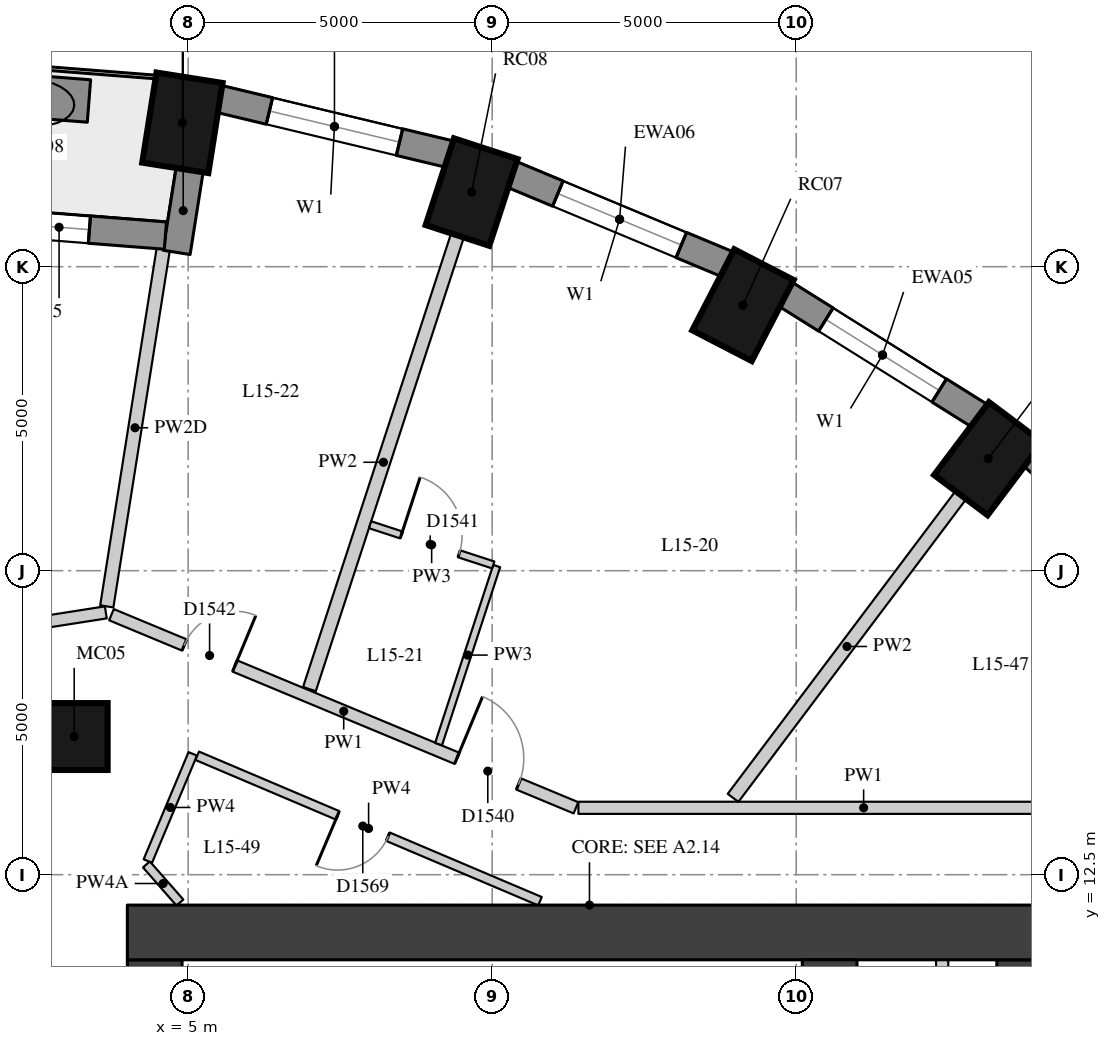
"""IFC4 building model, lengths in metres.
Left out: names, types, materials, properties, quantities, classifications, styles, units other than length and angle.
Written with IfcOpenShell. Run it as: python <this file> out.ifc"""

import sys

from ifc_helpers import new_model, si_unit, direction, frame, frame_2d, origin, origin_2d, place, context, subcontext, project, spatial, rectangle, extrude, element, fill, save


model = new_model("IFC4")
c1 = context("Model", 3, precision=1e-05, world=origin(), true_north=direction((0.0, 1.0)))
c2 = subcontext(c1, "Body", "Model", "MODEL_VIEW")
j1 = project(units=[si_unit("LENGTHUNIT", "METRE"), si_unit("PLANEANGLEUNIT", "RADIAN")], contexts=[c1])
p1 = place(None, origin())
s1 = spatial("IfcSite", under=j1, at=p1, CompositionType="ELEMENT")
p2 = place(p1, origin())
s2 = spatial("IfcBuilding", under=s1, at=p2, CompositionType="ELEMENT")
p3 = place(p2, frame((0.0, 0.0, 58.0)))
s3 = spatial("IfcBuildingStorey", under=s2, at=p3, CompositionType="ELEMENT", Elevation=58.0)
for number, where, z_axis, x_axis in (
    (1, (18.159, 19.343, 0.0), (0.0, 0.0, 1.0), (0.601, 0.799, 0.0)),
    (2, (14.125, 21.867, 0.0), (0.0, 0.0, 1.0), (0.46, 0.888, 0.0)),
    (3, (9.662, 23.727, 0.0), (0.0, 0.0, 1.0), (0.31, 0.951, 0.0)),
    (4, (4.906, 24.866, 0.0), (0.0, 0.0, 1.0), (0.156, 0.988, 0.0)),
):
    element("IfcColumn", number, at=place(p3, frame(where, z_axis=z_axis, x_axis=x_axis)), inside=s3, PredefinedType="COLUMN", context=c2, shape_type="SweptSolid", body=[
        extrude(rectangle(XDim=1.5, YDim=1.1, at=origin_2d()), origin(), (0.0, 0.0, 1.0), 3.3),
    ])
p4 = place(p3, frame((3.126, 14.772, 0.0), z_axis=(0.0, 0.0, 1.0), x_axis=(1.0, 0.0, 0.0)))
e5 = element("IfcColumn", 5, at=p4, inside=s3, PredefinedType="COLUMN", context=c2, shape_type="SweptSolid", body=[
    extrude(rectangle(XDim=1.1, YDim=1.1, at=origin_2d()), origin(), (0.0, 0.0, 1.0), 3.3),
])
p5 = place(p3, frame((21.627, 16.943, 0.0), z_axis=(0.0, 0.0, 1.0), x_axis=(-0.745526233716, 0.66647628228, 0.0)))
e6 = element("IfcWall", 6, at=p5, inside=s3, PredefinedType="SOLIDWALL", context=c2, shape_type="SweptSolid", body=[
    extrude(rectangle(XDim=3.697, YDim=0.45, at=frame_2d((1.848, 0.0))), origin(), (0.0, 0.0, 1.0), 3.02),
])
p6 = place(p3, frame((18.023, 20.044, 0.0), z_axis=(0.0, 0.0, 1.0), x_axis=(-0.847635480093, 0.530579016629, 0.0)))
e7 = element("IfcWall", 7, at=p6, inside=s3, PredefinedType="SOLIDWALL", context=c2, shape_type="SweptSolid", body=[
    extrude(rectangle(XDim=3.782, YDim=0.45, at=frame_2d((1.891, 0.0))), origin(), (0.0, 0.0, 1.0), 3.02),
])
p7 = place(p6, frame((0.791, 0.0, 0.4)))
e8 = element("IfcOpeningElement", 8, at=p7, cuts=e7, PredefinedType="OPENING", context=c2, shape_type="SweptSolid", body=[
    extrude(rectangle(XDim=2.2, YDim=1.75, at=frame_2d((1.1, 0.875))), frame((0.0, 0.235, 0.0), z_axis=(0.0, -1.0, 0.0), x_axis=(1.0, 0.0, 0.0)), (0.0, 0.0, 1.0), 0.47),
])
p8 = place(p3, frame((13.875, 22.537, 0.0), z_axis=(0.0, 0.0, 1.0), x_axis=(-0.923031964282, 0.384723267966, 0.0)))
e9 = element("IfcWall", 9, at=p8, inside=s3, PredefinedType="SOLIDWALL", context=c2, shape_type="SweptSolid", body=[
    extrude(rectangle(XDim=3.856, YDim=0.45, at=frame_2d((1.928, 0.0))), origin(), (0.0, 0.0, 1.0), 3.02),
])
p9 = place(p8, frame((0.828, 0.0, 0.4)))
e10 = element("IfcOpeningElement", 10, at=p9, cuts=e9, PredefinedType="OPENING", context=c2, shape_type="SweptSolid", body=[
    extrude(rectangle(XDim=2.2, YDim=1.75, at=frame_2d((1.1, 0.875))), frame((0.0, 0.235, 0.0), z_axis=(0.0, -1.0, 0.0), x_axis=(1.0, 0.0, 0.0)), (0.0, 0.0, 1.0), 0.47),
])
p10 = place(p3, frame((9.308, 24.35, 0.0), z_axis=(0.0, 0.0, 1.0), x_axis=(-0.972496561493, 0.232917233979, 0.0)))
e11 = element("IfcWall", 11, at=p10, inside=s3, PredefinedType="SOLIDWALL", context=c2, shape_type="SweptSolid", body=[
    extrude(rectangle(XDim=3.911, YDim=0.45, at=frame_2d((1.956, 0.0))), origin(), (0.0, 0.0, 1.0), 3.02),
])
p11 = place(p10, frame((0.855, 0.0, 0.4)))
e12 = element("IfcOpeningElement", 12, at=p11, cuts=e11, PredefinedType="OPENING", context=c2, shape_type="SweptSolid", body=[
    extrude(rectangle(XDim=2.2, YDim=1.75, at=frame_2d((1.1, 0.875))), frame((0.0, 0.235, 0.0), z_axis=(0.0, -1.0, 0.0), x_axis=(1.0, 0.0, 0.0)), (0.0, 0.0, 1.0), 0.47),
])
p12 = place(p3, frame((5.027, 24.108, 0.0), z_axis=(0.0, 0.0, 1.0), x_axis=(-0.156133927791, -0.98773589415, 0.0)))
e13 = element("IfcWall", 13, at=p12, inside=s3, PredefinedType="SOLIDWALL", context=c2, shape_type="SweptSolid", body=[
    extrude(rectangle(XDim=1.39, YDim=0.45, at=frame_2d((0.695, 0.0))), origin(), (0.0, 0.0, 1.0), 2.47),
])
p13 = place(p3, frame((4.626, 23.011, 0.0), z_axis=(0.0, 0.0, 1.0), x_axis=(-0.996937095772, 0.078207589615, 0.0)))
e14 = element("IfcWall", 14, at=p13, inside=s3, PredefinedType="SOLIDWALL", context=c2, shape_type="SweptSolid", body=[
    extrude(rectangle(XDim=4.657, YDim=0.45, at=frame_2d((2.329, 0.0))), origin(), (0.0, 0.0, 1.0), 3.02),
])
p14 = place(p13, frame((1.254, 0.0, 0.4)))
e15 = element("IfcOpeningElement", 15, at=p14, cuts=e14, PredefinedType="OPENING", context=c2, shape_type="SweptSolid", body=[
    extrude(rectangle(XDim=1.0, YDim=1.75, at=frame_2d((0.5, 0.875))), frame((0.0, 0.235, 0.0), z_axis=(0.0, -1.0, 0.0), x_axis=(1.0, 0.0, 0.0)), (0.0, 0.0, 1.0), 0.47),
])
p15 = place(p13, frame((2.404, 0.0, 0.0)))
e16 = element("IfcOpeningElement", 16, at=p15, cuts=e14, PredefinedType="OPENING", context=c2, shape_type="SweptSolid", body=[
    extrude(rectangle(XDim=1.0, YDim=2.15, at=frame_2d((0.5, 1.075))), frame((0.0, 0.235, 0.0), z_axis=(0.0, -1.0, 0.0), x_axis=(1.0, 0.0, 0.0)), (0.0, 0.0, 1.0), 0.47),
])
p16 = place(p3, frame((3.369, 25.225, 0.0), z_axis=(0.0, 0.0, 1.0), x_axis=(-0.996965267018, 0.077847648384, 0.0)))
e17 = element("IfcWall", 17, at=p16, inside=s3, PredefinedType="USERDEFINED", context=c2, shape_type="SweptSolid", body=[
    extrude(rectangle(XDim=1.8, YDim=0.7, at=frame_2d((0.9, 0.0))), origin(), (0.0, 0.0, 1.0), 0.75),
])
p17 = place(p3, frame((4.45, -11.1, 0.0), z_axis=(0.0, 0.0, 1.0), x_axis=(0.0, 1.0, 0.0)))
e18 = element("IfcWall", 18, at=p17, inside=s3, PredefinedType="SHEAR", context=c2, shape_type="SweptSolid", body=[
    extrude(rectangle(XDim=22.2, YDim=0.9, at=frame_2d((11.1, 0.0))), origin(), (0.0, 0.0, 1.0), 3.02),
])
p18 = place(p17, frame((2.35, 0.0, 0.0)))
e19 = element("IfcOpeningElement", 19, at=p18, cuts=e18, PredefinedType="OPENING", context=c2, shape_type="SweptSolid", body=[
    extrude(rectangle(XDim=1.5, YDim=2.1, at=frame_2d((0.75, 1.05))), frame((0.0, 0.46, 0.0), z_axis=(0.0, -1.0, 0.0), x_axis=(1.0, 0.0, 0.0)), (0.0, 0.0, 1.0), 0.92),
])
p19 = place(p17, frame((5.45, 0.0, 0.0)))
e20 = element("IfcOpeningElement", 20, at=p19, cuts=e18, PredefinedType="OPENING", context=c2, shape_type="SweptSolid", body=[
    extrude(rectangle(XDim=1.8, YDim=2.1, at=frame_2d((0.9, 1.05))), frame((0.0, 0.46, 0.0), z_axis=(0.0, -1.0, 0.0), x_axis=(1.0, 0.0, 0.0)), (0.0, 0.0, 1.0), 0.92),
])
p20 = place(p17, frame((7.95, 0.0, 0.0)))
e21 = element("IfcOpeningElement", 21, at=p20, cuts=e18, PredefinedType="OPENING", context=c2, shape_type="SweptSolid", body=[
    extrude(rectangle(XDim=1.1, YDim=2.1, at=frame_2d((0.55, 1.05))), frame((0.0, 0.46, 0.0), z_axis=(0.0, -1.0, 0.0), x_axis=(1.0, 0.0, 0.0)), (0.0, 0.0, 1.0), 0.92),
])
p21 = place(p17, frame((10.6, 0.0, 0.0)))
e22 = element("IfcOpeningElement", 22, at=p21, cuts=e18, PredefinedType="OPENING", context=c2, shape_type="SweptSolid", body=[
    extrude(rectangle(XDim=1.0, YDim=2.1, at=frame_2d((0.5, 1.05))), frame((0.0, 0.46, 0.0), z_axis=(0.0, -1.0, 0.0), x_axis=(1.0, 0.0, 0.0)), (0.0, 0.0, 1.0), 0.92),
])
p22 = place(p17, frame((13.15, 0.0, 0.0)))
e23 = element("IfcOpeningElement", 23, at=p22, cuts=e18, PredefinedType="OPENING", context=c2, shape_type="SweptSolid", body=[
    extrude(rectangle(XDim=1.1, YDim=2.1, at=frame_2d((0.55, 1.05))), frame((0.0, 0.46, 0.0), z_axis=(0.0, -1.0, 0.0), x_axis=(1.0, 0.0, 0.0)), (0.0, 0.0, 1.0), 0.92),
])
p23 = place(p17, frame((14.95, 0.0, 0.0)))
e24 = element("IfcOpeningElement", 24, at=p23, cuts=e18, PredefinedType="OPENING", context=c2, shape_type="SweptSolid", body=[
    extrude(rectangle(XDim=1.8, YDim=2.1, at=frame_2d((0.9, 1.05))), frame((0.0, 0.46, 0.0), z_axis=(0.0, -1.0, 0.0), x_axis=(1.0, 0.0, 0.0)), (0.0, 0.0, 1.0), 0.92),
])
p24 = place(p17, frame((18.35, 0.0, 0.0)))
e25 = element("IfcOpeningElement", 25, at=p24, cuts=e18, PredefinedType="OPENING", context=c2, shape_type="SweptSolid", body=[
    extrude(rectangle(XDim=1.5, YDim=2.1, at=frame_2d((0.75, 1.05))), frame((0.0, 0.46, 0.0), z_axis=(0.0, -1.0, 0.0), x_axis=(1.0, 0.0, 0.0)), (0.0, 0.0, 1.0), 0.92),
])
p25 = place(p3, frame((18.75, -11.1, 0.0), z_axis=(0.0, 0.0, 1.0), x_axis=(0.0, 1.0, 0.0)))
e26 = element("IfcWall", 26, at=p25, inside=s3, PredefinedType="SHEAR", context=c2, shape_type="SweptSolid", body=[
    extrude(rectangle(XDim=22.2, YDim=0.9, at=frame_2d((11.1, 0.0))), origin(), (0.0, 0.0, 1.0), 3.02),
])
p26 = place(p25, frame((16.175, 0.0, 0.0)))
e27 = element("IfcOpeningElement", 27, at=p26, cuts=e26, PredefinedType="OPENING", context=c2, shape_type="SweptSolid", body=[
    extrude(rectangle(XDim=1.5, YDim=2.1, at=frame_2d((0.75, 1.05))), frame((0.0, 0.46, 0.0), z_axis=(0.0, -1.0, 0.0), x_axis=(1.0, 0.0, 0.0)), (0.0, 0.0, 1.0), 0.92),
])
p27 = place(p25, frame((5.025, 0.0, 0.0)))
e28 = element("IfcOpeningElement", 28, at=p27, cuts=e26, PredefinedType="OPENING", context=c2, shape_type="SweptSolid", body=[
    extrude(rectangle(XDim=1.5, YDim=2.1, at=frame_2d((0.75, 1.05))), frame((0.0, 0.46, 0.0), z_axis=(0.0, -1.0, 0.0), x_axis=(1.0, 0.0, 0.0)), (0.0, 0.0, 1.0), 0.92),
])
p28 = place(p3, frame((4.0, 11.55, 0.0), z_axis=(0.0, 0.0, 1.0), x_axis=(1.0, 0.0, 0.0)))
e29 = element("IfcWall", 29, at=p28, inside=s3, PredefinedType="SHEAR", context=c2, shape_type="SweptSolid", body=[
    extrude(rectangle(XDim=15.2, YDim=0.9, at=frame_2d((7.6, 0.0))), origin(), (0.0, 0.0, 1.0), 3.02),
])
p29 = place(p3, frame((15.55, -11.1, 0.0), z_axis=(0.0, 0.0, 1.0), x_axis=(0.0, 1.0, 0.0)))
e30 = element("IfcWall", 30, at=p29, inside=s3, PredefinedType="SHEAR", context=c2, shape_type="SweptSolid", body=[
    extrude(rectangle(XDim=22.2, YDim=0.9, at=frame_2d((11.1, 0.0))), origin(), (0.0, 0.0, 1.0), 3.02),
])
p30 = place(p29, frame((15.6, 0.0, 0.0)))
e31 = element("IfcOpeningElement", 31, at=p30, cuts=e30, PredefinedType="OPENING", context=c2, shape_type="SweptSolid", body=[
    extrude(rectangle(XDim=1.0, YDim=2.1, at=frame_2d((0.5, 1.05))), frame((0.0, 0.46, 0.0), z_axis=(0.0, -1.0, 0.0), x_axis=(1.0, 0.0, 0.0)), (0.0, 0.0, 1.0), 0.92),
])
p31 = place(p29, frame((5.6, 0.0, 0.0)))
e32 = element("IfcOpeningElement", 32, at=p31, cuts=e30, PredefinedType="OPENING", context=c2, shape_type="SweptSolid", body=[
    extrude(rectangle(XDim=1.0, YDim=2.1, at=frame_2d((0.5, 1.05))), frame((0.0, 0.46, 0.0), z_axis=(0.0, -1.0, 0.0), x_axis=(1.0, 0.0, 0.0)), (0.0, 0.0, 1.0), 0.92),
])
p32 = place(p3, frame((17.4, 7.4, 0.0), z_axis=(0.0, 0.0, 1.0), x_axis=(0.0, 1.0, 0.0)))
e33 = element("IfcWall", 33, at=p32, inside=s3, PredefinedType="PARTITIONING", context=c2, shape_type="SweptSolid", body=[
    extrude(rectangle(XDim=3.7, YDim=0.2, at=frame_2d((1.85, 0.0))), origin(), (0.0, 0.0, 1.0), 3.02),
])
p33 = place(p3, frame((-7.234, 15.11, 0.0), z_axis=(0.0, 0.0, 1.0), x_axis=(0.987957763282, 0.154723811906, 0.0)))
e34 = element("IfcWall", 34, at=p33, inside=s3, PredefinedType="PARTITIONING", context=c2, shape_type="SweptSolid", body=[
    extrude(rectangle(XDim=11.012, YDim=0.2, at=frame_2d((5.506, 0.0))), origin(), (0.0, 0.0, 1.0), 3.02),
])
p34 = place(p33, frame((8.605, 0.0, 0.0)))
e35 = element("IfcOpeningElement", 35, at=p34, cuts=e34, PredefinedType="OPENING", context=c2, shape_type="SweptSolid", body=[
    extrude(rectangle(XDim=0.9, YDim=2.1, at=frame_2d((0.45, 1.05))), frame((0.0, 0.11, 0.0), z_axis=(0.0, -1.0, 0.0), x_axis=(1.0, 0.0, 0.0)), (0.0, 0.0, 1.0), 0.22),
])
p35 = place(p33, frame((5.116, 0.0, 0.0)))
e36 = element("IfcOpeningElement", 36, at=p35, cuts=e34, PredefinedType="OPENING", context=c2, shape_type="SweptSolid", body=[
    extrude(rectangle(XDim=0.9, YDim=2.1, at=frame_2d((0.45, 1.05))), frame((0.0, 0.11, 0.0), z_axis=(0.0, -1.0, 0.0), x_axis=(1.0, 0.0, 0.0)), (0.0, 0.0, 1.0), 0.22),
])
p36 = place(p33, frame((1.626, 0.0, 0.0)))
e37 = element("IfcOpeningElement", 37, at=p36, cuts=e34, PredefinedType="OPENING", context=c2, shape_type="SweptSolid", body=[
    extrude(rectangle(XDim=0.9, YDim=2.1, at=frame_2d((0.45, 1.05))), frame((0.0, 0.11, 0.0), z_axis=(0.0, -1.0, 0.0), x_axis=(1.0, 0.0, 0.0)), (0.0, 0.0, 1.0), 0.22),
])
p37 = place(p3, frame((3.739, 16.776, 0.0), z_axis=(0.0, 0.0, 1.0), x_axis=(0.923364778497, -0.383923802117, 0.0)))
e38 = element("IfcWall", 38, at=p37, inside=s3, PredefinedType="PARTITIONING", context=c2, shape_type="SweptSolid", body=[
    extrude(rectangle(XDim=8.273, YDim=0.2, at=frame_2d((4.137, 0.0))), origin(), (0.0, 0.0, 1.0), 3.02),
])
p38 = place(p37, frame((6.153, 0.0, 0.0)))
e39 = element("IfcOpeningElement", 39, at=p38, cuts=e38, PredefinedType="OPENING", context=c2, shape_type="SweptSolid", body=[
    extrude(rectangle(XDim=1.1, YDim=2.1, at=frame_2d((0.55, 1.05))), frame((0.0, 0.11, 0.0), z_axis=(0.0, -1.0, 0.0), x_axis=(1.0, 0.0, 0.0)), (0.0, 0.0, 1.0), 0.22),
])
p39 = place(p37, frame((1.298, 0.0, 0.0)))
e40 = element("IfcOpeningElement", 40, at=p39, cuts=e38, PredefinedType="OPENING", context=c2, shape_type="SweptSolid", body=[
    extrude(rectangle(XDim=0.9, YDim=2.1, at=frame_2d((0.45, 1.05))), frame((0.0, 0.11, 0.0), z_axis=(0.0, -1.0, 0.0), x_axis=(1.0, 0.0, 0.0)), (0.0, 0.0, 1.0), 0.22),
])
p40 = place(p3, frame((11.418, 13.6, 0.0), z_axis=(0.0, 0.0, 1.0), x_axis=(1.0, 0.0, 0.0)))
e41 = element("IfcWall", 41, at=p40, inside=s3, PredefinedType="PARTITIONING", context=c2, shape_type="SweptSolid", body=[
    extrude(rectangle(XDim=9.382, YDim=0.2, at=frame_2d((4.691, 0.0))), origin(), (0.0, 0.0, 1.0), 3.02),
])
p41 = place(p3, frame((4.865, 12.042, 0.0), z_axis=(0.0, 0.0, 1.0), x_axis=(-0.660014599896, 0.751252772323, 0.0)))
e42 = element("IfcWall", 42, at=p41, inside=s3, PredefinedType="PARTITIONING", context=c2, shape_type="SweptSolid", body=[
    extrude(rectangle(XDim=0.835, YDim=0.15, at=frame_2d((0.417, 0.0))), origin(), (0.0, 0.0, 1.0), 2.57),
])
p42 = place(p3, frame((4.337, 12.724, 0.0), z_axis=(0.0, 0.0, 1.0), x_axis=(0.386537433901, 0.922273718694, 0.0)))
e43 = element("IfcWall", 43, at=p42, inside=s3, PredefinedType="PARTITIONING", context=c2, shape_type="SweptSolid", body=[
    extrude(rectangle(XDim=1.911, YDim=0.15, at=frame_2d((0.956, 0.0))), origin(), (0.0, 0.0, 1.0), 3.02),
])
p43 = place(p3, frame((5.149, 14.456, 0.0), z_axis=(0.0, 0.0, 1.0), x_axis=(0.920541383735, -0.390645057348, 0.0)))
e44 = element("IfcWall", 44, at=p43, inside=s3, PredefinedType="PARTITIONING", context=c2, shape_type="SweptSolid", body=[
    extrude(rectangle(XDim=6.124, YDim=0.15, at=frame_2d((3.062, 0.0))), origin(), (0.0, 0.0, 1.0), 3.02),
])
p44 = place(p43, frame((2.508, 0.0, 0.0)))
e45 = element("IfcOpeningElement", 45, at=p44, cuts=e44, PredefinedType="OPENING", context=c2, shape_type="SweptSolid", body=[
    extrude(rectangle(XDim=0.9, YDim=2.1, at=frame_2d((0.45, 1.05))), frame((0.0, 0.085, 0.0), z_axis=(0.0, -1.0, 0.0), x_axis=(1.0, 0.0, 0.0)), (0.0, 0.0, 1.0), 0.17),
])
p45 = place(p3, frame((17.708, 18.743, 0.0), z_axis=(0.0, 0.0, 1.0), x_axis=(-0.601177883261, -0.799115231164, 0.0)))
e46 = element("IfcWall", 46, at=p45, inside=s3, PredefinedType="PARTITIONING", context=c2, shape_type="SweptSolid", body=[
    extrude(rectangle(XDim=6.231, YDim=0.22, at=frame_2d((3.116, 0.0))), origin(), (0.0, 0.0, 1.0), 3.02),
])
p46 = place(p3, frame((9.429, 23.014, 0.0), z_axis=(0.0, 0.0, 1.0), x_axis=(-0.310230839568, -0.950661257326, 0.0)))
e47 = element("IfcWall", 47, at=p46, inside=s3, PredefinedType="PARTITIONING", context=c2, shape_type="SweptSolid", body=[
    extrude(rectangle(XDim=7.849, YDim=0.22, at=frame_2d((3.925, 0.0))), origin(), (0.0, 0.0, 1.0), 3.02),
])
p47 = place(p3, frame((4.591, 22.789, 0.0), z_axis=(0.0, 0.0, 1.0), x_axis=(-0.156126964527, -0.987736994826, 0.0)))
e48 = element("IfcWall", 48, at=p47, inside=s3, PredefinedType="PARTITIONING", context=c2, shape_type="SweptSolid", body=[
    extrude(rectangle(XDim=5.948, YDim=0.22, at=frame_2d((2.974, 0.0))), origin(), (0.0, 0.0, 1.0), 2.47),
])
p48 = place(p3, frame((9.118, 14.648, 0.0), z_axis=(0.0, 0.0, 1.0), x_axis=(0.310277544614, 0.950646014723, 0.0)))
e49 = element("IfcWall", 49, at=p48, inside=s3, PredefinedType="PARTITIONING", context=c2, shape_type="SweptSolid", body=[
    extrude(rectangle(XDim=3.081, YDim=0.12, at=frame_2d((1.54, 0.0))), origin(), (0.0, 0.0, 1.0), 3.02),
])
p49 = place(p3, frame((10.017, 17.594, 0.0), z_axis=(0.0, 0.0, 1.0), x_axis=(-0.950613738429, 0.310376417129, 0.0)))
e50 = element("IfcWall", 50, at=p49, inside=s3, PredefinedType="PARTITIONING", context=c2, shape_type="SweptSolid", body=[
    extrude(rectangle(XDim=2.13, YDim=0.12, at=frame_2d((1.065, 0.0))), origin(), (0.0, 0.0, 1.0), 3.02),
])
p50 = place(p49, frame((0.59, 0.0, 0.0)))
e51 = element("IfcOpeningElement", 51, at=p50, cuts=e50, PredefinedType="OPENING", context=c2, shape_type="SweptSolid", body=[
    extrude(rectangle(XDim=1.0, YDim=2.1, at=frame_2d((0.5, 1.05))), frame((0.0, 0.07, 0.0), z_axis=(0.0, -1.0, 0.0), x_axis=(1.0, 0.0, 0.0)), (0.0, 0.0, 1.0), 0.14),
])
p51 = place(p7, origin())
e52 = element("IfcWindow", 52, at=p51, inside=s3, PartitioningType="SINGLE_PANEL", PredefinedType="WINDOW", context=c2, shape_type="SweptSolid", body=[
    extrude(rectangle(XDim=2.2, YDim=1.75, at=frame_2d((1.1, 0.875))), frame((0.0, 0.035, 0.0), z_axis=(0.0, -1.0, 0.0), x_axis=(1.0, 0.0, 0.0)), (0.0, 0.0, 1.0), 0.06),
])
fill(e8, e52)
p52 = place(p9, origin())
e53 = element("IfcWindow", 53, at=p52, inside=s3, PartitioningType="SINGLE_PANEL", PredefinedType="WINDOW", context=c2, shape_type="SweptSolid", body=[
    extrude(rectangle(XDim=2.2, YDim=1.75, at=frame_2d((1.1, 0.875))), frame((0.0, 0.035, 0.0), z_axis=(0.0, -1.0, 0.0), x_axis=(1.0, 0.0, 0.0)), (0.0, 0.0, 1.0), 0.06),
])
fill(e10, e53)
p53 = place(p11, origin())
e54 = element("IfcWindow", 54, at=p53, inside=s3, PartitioningType="SINGLE_PANEL", PredefinedType="WINDOW", context=c2, shape_type="SweptSolid", body=[
    extrude(rectangle(XDim=2.2, YDim=1.75, at=frame_2d((1.1, 0.875))), frame((0.0, 0.035, 0.0), z_axis=(0.0, -1.0, 0.0), x_axis=(1.0, 0.0, 0.0)), (0.0, 0.0, 1.0), 0.06),
])
fill(e12, e54)
p54 = place(p14, origin())
e55 = element("IfcWindow", 55, at=p54, inside=s3, PartitioningType="SINGLE_PANEL", PredefinedType="WINDOW", context=c2, shape_type="SweptSolid", body=[
    extrude(rectangle(XDim=1.0, YDim=1.75, at=frame_2d((0.5, 0.875))), frame((0.0, 0.035, 0.0), z_axis=(0.0, -1.0, 0.0), x_axis=(1.0, 0.0, 0.0)), (0.0, 0.0, 1.0), 0.06),
])
fill(e15, e55)
p55 = place(p38, origin())
e56 = element("IfcDoor", 56, at=p55, inside=s3, OperationType="SINGLE_SWING_LEFT", PredefinedType="DOOR", context=c2, shape_type="SweptSolid", body=[
    extrude(rectangle(XDim=1.1, YDim=2.1, at=frame_2d((0.55, 1.05))), frame((0.0, 0.025, 0.0), z_axis=(0.0, -1.0, 0.0), x_axis=(1.0, 0.0, 0.0)), (0.0, 0.0, 1.0), 0.05),
])
fill(e39, e56)
p56 = place(p50, origin())
e57 = element("IfcDoor", 57, at=p56, inside=s3, OperationType="SINGLE_SWING_LEFT", PredefinedType="DOOR", context=c2, shape_type="SweptSolid", body=[
    extrude(rectangle(XDim=1.0, YDim=2.1, at=frame_2d((0.5, 1.05))), frame((0.0, 0.025, 0.0), z_axis=(0.0, -1.0, 0.0), x_axis=(1.0, 0.0, 0.0)), (0.0, 0.0, 1.0), 0.05),
])
fill(e51, e57)
p57 = place(p39, origin())
e58 = element("IfcDoor", 58, at=p57, inside=s3, OperationType="SINGLE_SWING_RIGHT", PredefinedType="DOOR", context=c2, shape_type="SweptSolid", body=[
    extrude(rectangle(XDim=0.9, YDim=2.1, at=frame_2d((0.45, 1.05))), frame((0.0, 0.025, 0.0), z_axis=(0.0, -1.0, 0.0), x_axis=(1.0, 0.0, 0.0)), (0.0, 0.0, 1.0), 0.05),
])
fill(e40, e58)
p58 = place(p44, origin())
e59 = element("IfcDoor", 59, at=p58, inside=s3, OperationType="SINGLE_SWING_RIGHT", PredefinedType="DOOR", context=c2, shape_type="SweptSolid", body=[
    extrude(rectangle(XDim=0.9, YDim=2.1, at=frame_2d((0.45, 1.05))), frame((0.0, 0.025, 0.0), z_axis=(0.0, -1.0, 0.0), x_axis=(1.0, 0.0, 0.0)), (0.0, 0.0, 1.0), 0.05),
])
fill(e45, e59)
save(model, sys.argv[1])
